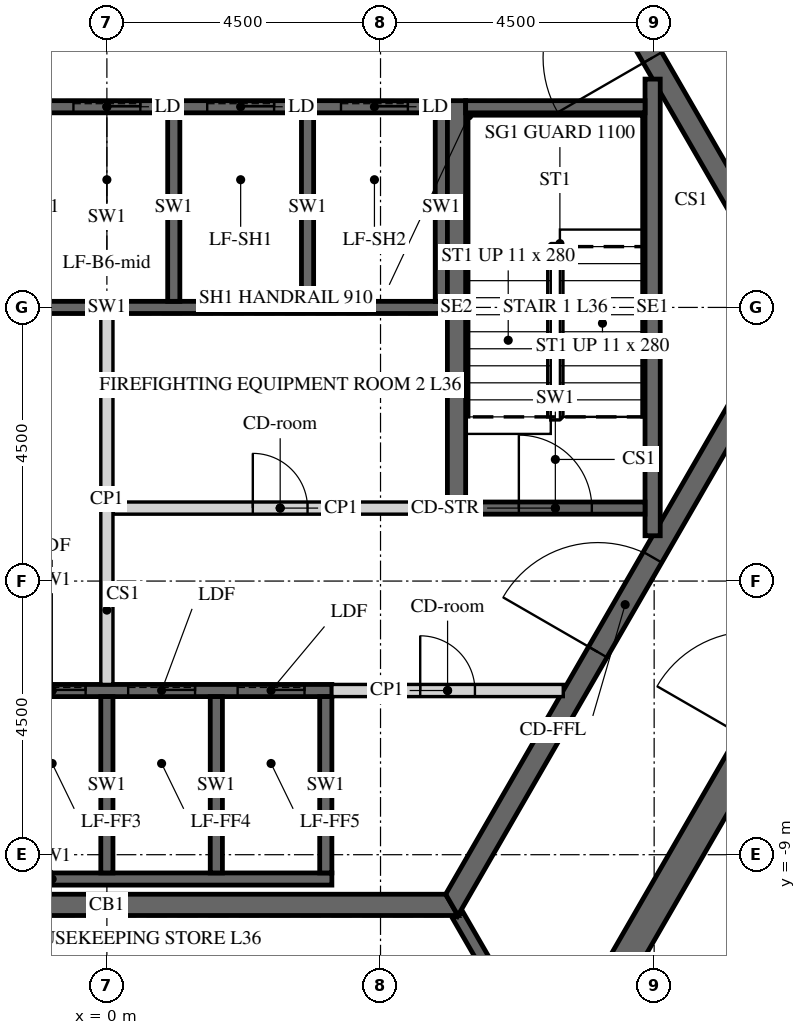
"""IFC4 building model, lengths in metres.
Left out: names, types, materials, properties, quantities, classifications, styles, units other than length and angle.
Written with IfcOpenShell. Run it as: python <this file> out.ifc"""

import sys

from ifc_helpers import new_model, si_unit, direction, frame, frame_2d, origin, place, context, subcontext, project, spatial, polyline, rectangle, outline, extrude, element, fill, save


model = new_model("IFC4")
c1 = context("Model", 3, precision=1e-05, world=origin(), true_north=direction((0.0, 1.0)))
c2 = subcontext(c1, "Body", "Model", "MODEL_VIEW")
j1 = project(units=[si_unit("LENGTHUNIT", "METRE"), si_unit("PLANEANGLEUNIT", "RADIAN")], contexts=[c1])
p1 = place(None, origin())
s1 = spatial("IfcSite", under=j1, at=p1, CompositionType="ELEMENT")
p2 = place(p1, origin())
s2 = spatial("IfcBuilding", under=s1, at=p2, CompositionType="ELEMENT")
p3 = place(p2, frame((0.0, 0.0, 156.6)))
s3 = spatial("IfcBuildingStorey", under=s2, at=p3, CompositionType="ELEMENT", Elevation=156.6)
p4 = place(p3, frame((7.361, -12.75, -0.15), z_axis=(0.0, 0.0, 1.0), x_axis=(0.50000571537, 0.866022103989, 0.0)))
e1 = element("IfcWall", 1, at=p4, inside=s3, PredefinedType="SHEAR", context=c2, shape_type="SweptSolid", body=[
    extrude(outline(polyline([(-0.144, -0.25), (14.867, -0.25), (14.578, 0.25), (0.144, 0.25), (-0.144, -0.25)])), origin(), (0.0, 0.0, 1.0), 3.9),
])
p5 = place(p4, frame((6.49, 0.0, 0.15)))
e2 = element("IfcOpeningElement", 2, at=p5, cuts=e1, PredefinedType="OPENING", context=c2, shape_type="SweptSolid", body=[
    extrude(rectangle(XDim=1.8, YDim=2.4, at=frame_2d((0.9, 1.2))), frame((0.0, 0.26, 0.0), z_axis=(0.0, -1.0, 0.0), x_axis=(1.0, 0.0, 0.0)), (0.0, 0.0, 1.0), 0.52),
])
p6 = place(p3, frame((14.722, 0.0, -0.15), z_axis=(0.0, 0.0, 1.0), x_axis=(-0.50000571537, 0.866022103989, 0.0)))
e3 = element("IfcWall", 3, at=p6, inside=s3, PredefinedType="SHEAR", context=c2, shape_type="SweptSolid", body=[
    extrude(outline(polyline([(-0.144, -0.25), (14.867, -0.25), (14.578, 0.25), (0.144, 0.25), (-0.144, -0.25)])), origin(), (0.0, 0.0, 1.0), 3.9),
])
p7 = place(p6, frame((6.432, 0.0, 0.15)))
e4 = element("IfcOpeningElement", 4, at=p7, cuts=e3, PredefinedType="OPENING", context=c2, shape_type="SweptSolid", body=[
    extrude(rectangle(XDim=1.8, YDim=2.4, at=frame_2d((0.9, 1.2))), frame((0.0, 0.26, 0.0), z_axis=(0.0, -1.0, 0.0), x_axis=(1.0, 0.0, 0.0)), (0.0, 0.0, 1.0), 0.52),
])
p8 = place(p3, frame((-5.673, -9.825, -0.15), z_axis=(0.0, 0.0, 1.0), x_axis=(1.0, 0.0, 0.0)))
e5 = element("IfcWall", 5, at=p8, inside=s3, PredefinedType="SHEAR", context=c2, shape_type="SweptSolid", body=[
    extrude(outline(polyline([(-0.101, -0.175), (11.446, -0.175), (11.244, 0.175), (0.101, 0.175), (-0.101, -0.175)])), origin(), (0.0, 0.0, 1.0), 3.9),
])
p9 = place(p3, frame((5.673, -9.825, -0.15), z_axis=(0.0, 0.0, 1.0), x_axis=(0.499995046907, 0.866028263435, 0.0)))
e6 = element("IfcWall", 6, at=p9, inside=s3, PredefinedType="SHEAR", context=c2, shape_type="SweptSolid", body=[
    extrude(outline(polyline([(-0.101, -0.175), (11.446, -0.175), (11.244, 0.175), (0.101, 0.175), (-0.101, -0.175)])), origin(), (0.0, 0.0, 1.0), 3.9),
])
p10 = place(p9, frame((4.801, 0.0, 0.15)))
e7 = element("IfcOpeningElement", 7, at=p10, cuts=e6, PredefinedType="OPENING", context=c2, shape_type="SweptSolid", body=[
    extrude(rectangle(XDim=1.8, YDim=2.4, at=frame_2d((0.9, 1.2))), frame((0.0, 0.185, 0.0), z_axis=(0.0, -1.0, 0.0), x_axis=(1.0, 0.0, 0.0)), (0.0, 0.0, 1.0), 0.37),
])
p11 = place(p3, frame((11.345, 0.0, -0.15), z_axis=(0.0, 0.0, 1.0), x_axis=(-0.499995046907, 0.866028263435, 0.0)))
e8 = element("IfcWall", 8, at=p11, inside=s3, PredefinedType="SHEAR", context=c2, shape_type="SweptSolid", body=[
    extrude(outline(polyline([(-0.101, -0.175), (11.446, -0.175), (11.244, 0.175), (0.101, 0.175), (-0.101, -0.175)])), origin(), (0.0, 0.0, 1.0), 3.9),
])
p12 = place(p11, frame((4.744, 0.0, 0.15)))
e9 = element("IfcOpeningElement", 9, at=p12, cuts=e8, PredefinedType="OPENING", context=c2, shape_type="SweptSolid", body=[
    extrude(rectangle(XDim=1.8, YDim=2.4, at=frame_2d((0.9, 1.2))), frame((0.0, 0.185, 0.0), z_axis=(0.0, -1.0, 0.0), x_axis=(1.0, 0.0, 0.0)), (0.0, 0.0, 1.0), 0.37),
])
p13 = place(p3, frame((-5.6, 3.3, -0.25), z_axis=(0.0, 0.0, 1.0), x_axis=(1.0, 0.0, 0.0)))
e10 = element("IfcWall", 10, at=p13, inside=s3, PredefinedType="SHEAR", context=c2, shape_type="SweptSolid", body=[
    extrude(rectangle(XDim=11.2, YDim=0.2, at=frame_2d((5.6, 0.0))), origin(), (0.0, 0.0, 1.0), 3.9),
])
p14 = place(p13, frame((0.65, 0.0, 0.25)))
e11 = element("IfcOpeningElement", 11, at=p14, cuts=e10, PredefinedType="OPENING", context=c2, shape_type="SweptSolid", body=[
    extrude(rectangle(XDim=1.1, YDim=2.1, at=frame_2d((0.55, 1.05))), frame((0.0, 0.11, 0.0), z_axis=(0.0, -1.0, 0.0), x_axis=(1.0, 0.0, 0.0)), (0.0, 0.0, 1.0), 0.22),
])
p15 = place(p13, frame((2.85, 0.0, 0.25)))
e12 = element("IfcOpeningElement", 12, at=p15, cuts=e10, PredefinedType="OPENING", context=c2, shape_type="SweptSolid", body=[
    extrude(rectangle(XDim=1.1, YDim=2.1, at=frame_2d((0.55, 1.05))), frame((0.0, 0.11, 0.0), z_axis=(0.0, -1.0, 0.0), x_axis=(1.0, 0.0, 0.0)), (0.0, 0.0, 1.0), 0.22),
])
p16 = place(p13, frame((5.05, 0.0, 0.25)))
e13 = element("IfcOpeningElement", 13, at=p16, cuts=e10, PredefinedType="OPENING", context=c2, shape_type="SweptSolid", body=[
    extrude(rectangle(XDim=1.1, YDim=2.1, at=frame_2d((0.55, 1.05))), frame((0.0, 0.11, 0.0), z_axis=(0.0, -1.0, 0.0), x_axis=(1.0, 0.0, 0.0)), (0.0, 0.0, 1.0), 0.22),
])
p17 = place(p13, frame((7.25, 0.0, 0.25)))
e14 = element("IfcOpeningElement", 14, at=p17, cuts=e10, PredefinedType="OPENING", context=c2, shape_type="SweptSolid", body=[
    extrude(rectangle(XDim=1.1, YDim=2.1, at=frame_2d((0.55, 1.05))), frame((0.0, 0.11, 0.0), z_axis=(0.0, -1.0, 0.0), x_axis=(1.0, 0.0, 0.0)), (0.0, 0.0, 1.0), 0.22),
])
p18 = place(p13, frame((9.45, 0.0, 0.25)))
e15 = element("IfcOpeningElement", 15, at=p18, cuts=e10, PredefinedType="OPENING", context=c2, shape_type="SweptSolid", body=[
    extrude(rectangle(XDim=1.1, YDim=2.1, at=frame_2d((0.55, 1.05))), frame((0.0, 0.11, 0.0), z_axis=(0.0, -1.0, 0.0), x_axis=(1.0, 0.0, 0.0)), (0.0, 0.0, 1.0), 0.22),
])
p19 = place(p3, frame((-5.6, 0.0, -0.25), z_axis=(0.0, 0.0, 1.0), x_axis=(1.0, 0.0, 0.0)))
e16 = element("IfcWall", 16, at=p19, inside=s3, PredefinedType="SHEAR", context=c2, shape_type="SweptSolid", body=[
    extrude(rectangle(XDim=11.2, YDim=0.2, at=frame_2d((5.6, 0.0))), origin(), (0.0, 0.0, 1.0), 3.9),
])
for number, where, z_axis, x_axis in (
    (17, (1.1, 0.1, -0.25), (0.0, 0.0, 1.0), (0.0, 1.0, 0.0)),
    (18, (3.3, 0.1, -0.25), (0.0, 0.0, 1.0), (0.0, 1.0, 0.0)),
    (19, (5.5, 0.1, -0.25), (0.0, 0.0, 1.0), (0.0, 1.0, 0.0)),
):
    element("IfcWall", number, at=place(p3, frame(where, z_axis=z_axis, x_axis=x_axis)), inside=s3, PredefinedType="SHEAR", context=c2, shape_type="SweptSolid", body=[
        extrude(rectangle(XDim=3.1, YDim=0.2, at=frame_2d((1.55, 0.0))), origin(), (0.0, 0.0, 1.0), 3.9),
    ])
p20 = place(p3, frame((-5.5, -6.3, -0.25), z_axis=(0.0, 0.0, 1.0), x_axis=(1.0, 0.0, 0.0)))
e20 = element("IfcWall", 20, at=p20, inside=s3, PredefinedType="SHEAR", context=c2, shape_type="SweptSolid", body=[
    extrude(rectangle(XDim=9.2, YDim=0.2, at=frame_2d((4.6, 0.0))), origin(), (0.0, 0.0, 1.0), 3.9),
])
p21 = place(p20, frame((0.45, 0.0, 0.25)))
e21 = element("IfcOpeningElement", 21, at=p21, cuts=e20, PredefinedType="OPENING", context=c2, shape_type="SweptSolid", body=[
    extrude(rectangle(XDim=1.1, YDim=2.1, at=frame_2d((0.55, 1.05))), frame((0.0, 0.11, 0.0), z_axis=(0.0, -1.0, 0.0), x_axis=(1.0, 0.0, 0.0)), (0.0, 0.0, 1.0), 0.22),
])
p22 = place(p20, frame((2.25, 0.0, 0.25)))
e22 = element("IfcOpeningElement", 22, at=p22, cuts=e20, PredefinedType="OPENING", context=c2, shape_type="SweptSolid", body=[
    extrude(rectangle(XDim=1.1, YDim=2.1, at=frame_2d((0.55, 1.05))), frame((0.0, 0.11, 0.0), z_axis=(0.0, -1.0, 0.0), x_axis=(1.0, 0.0, 0.0)), (0.0, 0.0, 1.0), 0.22),
])
p23 = place(p20, frame((4.05, 0.0, 0.25)))
e23 = element("IfcOpeningElement", 23, at=p23, cuts=e20, PredefinedType="OPENING", context=c2, shape_type="SweptSolid", body=[
    extrude(rectangle(XDim=1.1, YDim=2.1, at=frame_2d((0.55, 1.05))), frame((0.0, 0.11, 0.0), z_axis=(0.0, -1.0, 0.0), x_axis=(1.0, 0.0, 0.0)), (0.0, 0.0, 1.0), 0.22),
])
p24 = place(p20, frame((5.85, 0.0, 0.25)))
e24 = element("IfcOpeningElement", 24, at=p24, cuts=e20, PredefinedType="OPENING", context=c2, shape_type="SweptSolid", body=[
    extrude(rectangle(XDim=1.1, YDim=2.1, at=frame_2d((0.55, 1.05))), frame((0.0, 0.11, 0.0), z_axis=(0.0, -1.0, 0.0), x_axis=(1.0, 0.0, 0.0)), (0.0, 0.0, 1.0), 0.22),
])
p25 = place(p20, frame((7.65, 0.0, 0.25)))
e25 = element("IfcOpeningElement", 25, at=p25, cuts=e20, PredefinedType="OPENING", context=c2, shape_type="SweptSolid", body=[
    extrude(rectangle(XDim=1.1, YDim=2.1, at=frame_2d((0.55, 1.05))), frame((0.0, 0.11, 0.0), z_axis=(0.0, -1.0, 0.0), x_axis=(1.0, 0.0, 0.0)), (0.0, 0.0, 1.0), 0.22),
])
p26 = place(p3, frame((-5.5, -9.4, -0.25), z_axis=(0.0, 0.0, 1.0), x_axis=(1.0, 0.0, 0.0)))
e26 = element("IfcWall", 26, at=p26, inside=s3, PredefinedType="SHEAR", context=c2, shape_type="SweptSolid", body=[
    extrude(rectangle(XDim=9.2, YDim=0.2, at=frame_2d((4.6, 0.0))), origin(), (0.0, 0.0, 1.0), 3.9),
])
for number, where, z_axis, x_axis in (
    (27, (0.0, -9.3, -0.25), (0.0, 0.0, 1.0), (0.0, 1.0, 0.0)),
    (28, (1.8, -9.3, -0.25), (0.0, 0.0, 1.0), (0.0, 1.0, 0.0)),
    (29, (3.6, -9.3, -0.25), (0.0, 0.0, 1.0), (0.0, 1.0, 0.0)),
):
    element("IfcWall", number, at=place(p3, frame(where, z_axis=z_axis, x_axis=x_axis)), inside=s3, PredefinedType="SHEAR", context=c2, shape_type="SweptSolid", body=[
        extrude(rectangle(XDim=2.9, YDim=0.2, at=frame_2d((1.45, 0.0))), origin(), (0.0, 0.0, 1.0), 3.9),
    ])
p27 = place(p3, frame((0.1, -3.3, 0.0), z_axis=(0.0, 0.0, 1.0), x_axis=(1.0, 0.0, 0.0)))
e30 = element("IfcWall", 30, at=p27, inside=s3, PredefinedType="PARTITIONING", context=c2, shape_type="SweptSolid", body=[
    extrude(rectangle(XDim=5.5, YDim=0.2, at=frame_2d((2.75, 0.0))), origin(), (0.0, 0.0, 1.0), 3.65),
])
p28 = place(p27, frame((2.3, 0.0, 0.0)))
e31 = element("IfcOpeningElement", 31, at=p28, cuts=e30, PredefinedType="OPENING", context=c2, shape_type="SweptSolid", body=[
    extrude(rectangle(XDim=0.9, YDim=2.1, at=frame_2d((0.45, 1.05))), frame((0.0, 0.11, 0.0), z_axis=(0.0, -1.0, 0.0), x_axis=(1.0, 0.0, 0.0)), (0.0, 0.0, 1.0), 0.22),
])
p29 = place(p3, frame((0.0, -6.2, 0.0), z_axis=(0.0, 0.0, 1.0), x_axis=(0.0, 1.0, 0.0)))
e32 = element("IfcWall", 32, at=p29, inside=s3, PredefinedType="PARTITIONING", context=c2, shape_type="SweptSolid", body=[
    extrude(rectangle(XDim=6.1, YDim=0.2, at=frame_2d((3.05, 0.0))), origin(), (0.0, 0.0, 1.0), 3.65),
])
p30 = place(p3, frame((3.7, -6.3, 0.0), z_axis=(0.0, 0.0, 1.0), x_axis=(1.0, 0.0, 0.0)))
e33 = element("IfcWall", 33, at=p30, inside=s3, PredefinedType="PARTITIONING", context=c2, shape_type="SweptSolid", body=[
    extrude(rectangle(XDim=3.806, YDim=0.2, at=frame_2d((1.903, 0.0))), origin(), (0.0, 0.0, 1.0), 3.65),
])
p31 = place(p30, frame((1.453, 0.0, 0.0)))
e34 = element("IfcOpeningElement", 34, at=p31, cuts=e33, PredefinedType="OPENING", context=c2, shape_type="SweptSolid", body=[
    extrude(rectangle(XDim=0.9, YDim=2.1, at=frame_2d((0.45, 1.05))), frame((0.0, 0.11, 0.0), z_axis=(0.0, -1.0, 0.0), x_axis=(1.0, 0.0, 0.0)), (0.0, 0.0, 1.0), 0.22),
])
p32 = place(p3, frame((5.773, -10.0, -0.15), z_axis=(0.0, 0.0, 1.0), x_axis=(0.499995765644, -0.866027848477, 0.0)))
e35 = element("IfcWall", 35, at=p32, inside=s3, PredefinedType="SHEAR", context=c2, shape_type="SweptSolid", body=[
    extrude(rectangle(XDim=2.887, YDim=0.2, at=frame_2d((1.443, 0.0))), origin(), (0.0, 0.0, 1.0), 3.9),
])
p33 = place(p3, frame((5.75, -3.4, -0.25), z_axis=(0.0, 0.0, 1.0), x_axis=(0.0, 1.0, 0.0)))
e36 = element("IfcWall", 36, at=p33, inside=s3, PredefinedType="SHEAR", context=c2, shape_type="SweptSolid", body=[
    extrude(rectangle(XDim=6.8, YDim=0.3, at=frame_2d((3.4, 0.0))), origin(), (0.0, 0.0, 1.0), 3.9),
])
p34 = place(p3, frame((8.975, -3.755, -0.25), z_axis=(0.0, 0.0, 1.0), x_axis=(0.0, 1.0, 0.0)))
e37 = element("IfcWall", 37, at=p34, inside=s3, PredefinedType="SHEAR", context=c2, shape_type="SweptSolid", body=[
    extrude(rectangle(XDim=7.51, YDim=0.25, at=frame_2d((3.755, 0.0))), origin(), (0.0, 0.0, 1.0), 3.9),
])
p35 = place(p3, frame((5.9, 3.3, -0.25), z_axis=(0.0, 0.0, 1.0), x_axis=(1.0, 0.0, 0.0)))
e38 = element("IfcWall", 38, at=p35, inside=s3, PredefinedType="SHEAR", context=c2, shape_type="SweptSolid", body=[
    extrude(rectangle(XDim=2.95, YDim=0.2, at=frame_2d((1.475, 0.0))), origin(), (0.0, 0.0, 1.0), 3.9),
])
p36 = place(p3, frame((5.9, -3.3, -0.25), z_axis=(0.0, 0.0, 1.0), x_axis=(1.0, 0.0, 0.0)))
e39 = element("IfcWall", 39, at=p36, inside=s3, PredefinedType="SHEAR", context=c2, shape_type="SweptSolid", body=[
    extrude(rectangle(XDim=2.95, YDim=0.2, at=frame_2d((1.475, 0.0))), origin(), (0.0, 0.0, 1.0), 3.9),
])
p37 = place(p36, frame((0.875, 0.0, 0.25)))
e40 = element("IfcOpeningElement", 40, at=p37, cuts=e39, PredefinedType="OPENING", context=c2, shape_type="SweptSolid", body=[
    extrude(rectangle(XDim=1.2, YDim=2.4, at=frame_2d((0.6, 1.2))), frame((0.0, 0.11, 0.0), z_axis=(0.0, -1.0, 0.0), x_axis=(1.0, 0.0, 0.0)), (0.0, 0.0, 1.0), 0.22),
])
p38 = place(p3, frame((17.046, 0.075, 0.0), z_axis=(0.0, 0.0, 1.0), x_axis=(-0.499999403554, 0.866025748143, 0.0)))
e41 = element("IfcWall", 41, at=p38, inside=s3, PredefinedType="PARTITIONING", context=c2, shape_type="SweptSolid", body=[
    extrude(rectangle(XDim=14.549, YDim=0.15, at=frame_2d((7.275, 0.0))), origin(), (0.0, 0.0, 1.0), 2.823),
])
p39 = place(p38, frame((1.781, 0.0, 0.0)))
e42 = element("IfcOpeningElement", 42, at=p39, cuts=e41, PredefinedType="OPENING", context=c2, shape_type="SweptSolid", body=[
    extrude(rectangle(XDim=1.0, YDim=2.1, at=frame_2d((0.5, 1.05))), frame((0.0, 0.085, 0.0), z_axis=(0.0, -1.0, 0.0), x_axis=(1.0, 0.0, 0.0)), (0.0, 0.0, 1.0), 0.17),
])
p40 = place(p38, frame((8.705, 0.0, 0.0)))
e43 = element("IfcOpeningElement", 43, at=p40, cuts=e41, PredefinedType="OPENING", context=c2, shape_type="SweptSolid", body=[
    extrude(rectangle(XDim=1.0, YDim=2.1, at=frame_2d((0.5, 1.05))), frame((0.0, 0.085, 0.0), z_axis=(0.0, -1.0, 0.0), x_axis=(1.0, 0.0, 0.0)), (0.0, 0.0, 1.0), 0.17),
])
p41 = place(p12, origin())
e44 = element("IfcDoor", 44, at=p41, inside=s3, OperationType="DOUBLE_DOOR_SINGLE_SWING", PredefinedType="DOOR", context=c2, shape_type="SweptSolid", body=[
    extrude(rectangle(XDim=1.8, YDim=2.4, at=frame_2d((0.9, 1.2))), frame((0.0, 0.025, 0.0), z_axis=(0.0, -1.0, 0.0), x_axis=(1.0, 0.0, 0.0)), (0.0, 0.0, 1.0), 0.05),
])
fill(e9, e44)
p42 = place(p10, origin())
e45 = element("IfcDoor", 45, at=p42, inside=s3, OperationType="DOUBLE_DOOR_SINGLE_SWING", PredefinedType="DOOR", context=c2, shape_type="SweptSolid", body=[
    extrude(rectangle(XDim=1.8, YDim=2.4, at=frame_2d((0.9, 1.2))), frame((0.0, 0.025, 0.0), z_axis=(0.0, -1.0, 0.0), x_axis=(1.0, 0.0, 0.0)), (0.0, 0.0, 1.0), 0.05),
])
fill(e7, e45)
p43 = place(p28, origin())
e46 = element("IfcDoor", 46, at=p43, inside=s3, OperationType="SINGLE_SWING_LEFT", PredefinedType="DOOR", context=c2, shape_type="SweptSolid", body=[
    extrude(rectangle(XDim=0.9, YDim=2.1, at=frame_2d((0.45, 1.05))), frame((0.0, 0.025, 0.0), z_axis=(0.0, -1.0, 0.0), x_axis=(1.0, 0.0, 0.0)), (0.0, 0.0, 1.0), 0.05),
])
fill(e31, e46)
p44 = place(p31, origin())
e47 = element("IfcDoor", 47, at=p44, inside=s3, OperationType="SINGLE_SWING_LEFT", PredefinedType="DOOR", context=c2, shape_type="SweptSolid", body=[
    extrude(rectangle(XDim=0.9, YDim=2.1, at=frame_2d((0.45, 1.05))), frame((0.0, 0.025, 0.0), z_axis=(0.0, -1.0, 0.0), x_axis=(1.0, 0.0, 0.0)), (0.0, 0.0, 1.0), 0.05),
])
fill(e34, e47)
p45 = place(p37, origin())
e48 = element("IfcDoor", 48, at=p45, inside=s3, OperationType="SINGLE_SWING_LEFT", PredefinedType="DOOR", context=c2, shape_type="SweptSolid", body=[
    extrude(rectangle(XDim=1.2, YDim=2.4, at=frame_2d((0.6, 1.2))), frame((0.0, 0.025, 0.0), z_axis=(0.0, -1.0, 0.0), x_axis=(1.0, 0.0, 0.0)), (0.0, 0.0, 1.0), 0.05),
])
fill(e40, e48)
p46 = place(p16, origin())
e49 = element("IfcDoor", 49, at=p46, inside=s3, OperationType="SLIDING_TO_LEFT", PredefinedType="DOOR", context=c2, shape_type="SweptSolid", body=[
    extrude(rectangle(XDim=1.1, YDim=2.1, at=frame_2d((0.55, 1.05))), frame((0.0, 0.025, 0.0), z_axis=(0.0, -1.0, 0.0), x_axis=(1.0, 0.0, 0.0)), (0.0, 0.0, 1.0), 0.05),
])
fill(e13, e49)
p47 = place(p17, origin())
e50 = element("IfcDoor", 50, at=p47, inside=s3, OperationType="SLIDING_TO_LEFT", PredefinedType="DOOR", context=c2, shape_type="SweptSolid", body=[
    extrude(rectangle(XDim=1.1, YDim=2.1, at=frame_2d((0.55, 1.05))), frame((0.0, 0.025, 0.0), z_axis=(0.0, -1.0, 0.0), x_axis=(1.0, 0.0, 0.0)), (0.0, 0.0, 1.0), 0.05),
])
fill(e14, e50)
p48 = place(p18, origin())
e51 = element("IfcDoor", 51, at=p48, inside=s3, OperationType="SLIDING_TO_LEFT", PredefinedType="DOOR", context=c2, shape_type="SweptSolid", body=[
    extrude(rectangle(XDim=1.1, YDim=2.1, at=frame_2d((0.55, 1.05))), frame((0.0, 0.025, 0.0), z_axis=(0.0, -1.0, 0.0), x_axis=(1.0, 0.0, 0.0)), (0.0, 0.0, 1.0), 0.05),
])
fill(e15, e51)
p49 = place(p23, origin())
e52 = element("IfcDoor", 52, at=p49, inside=s3, OperationType="SLIDING_TO_LEFT", PredefinedType="DOOR", context=c2, shape_type="SweptSolid", body=[
    extrude(rectangle(XDim=1.1, YDim=2.1, at=frame_2d((0.55, 1.05))), frame((0.0, 0.025, 0.0), z_axis=(0.0, -1.0, 0.0), x_axis=(1.0, 0.0, 0.0)), (0.0, 0.0, 1.0), 0.05),
])
fill(e23, e52)
p50 = place(p24, origin())
e53 = element("IfcDoor", 53, at=p50, inside=s3, OperationType="SLIDING_TO_LEFT", PredefinedType="DOOR", context=c2, shape_type="SweptSolid", body=[
    extrude(rectangle(XDim=1.1, YDim=2.1, at=frame_2d((0.55, 1.05))), frame((0.0, 0.025, 0.0), z_axis=(0.0, -1.0, 0.0), x_axis=(1.0, 0.0, 0.0)), (0.0, 0.0, 1.0), 0.05),
])
fill(e24, e53)
p51 = place(p25, origin())
e54 = element("IfcDoor", 54, at=p51, inside=s3, OperationType="SLIDING_TO_LEFT", PredefinedType="DOOR", context=c2, shape_type="SweptSolid", body=[
    extrude(rectangle(XDim=1.1, YDim=2.1, at=frame_2d((0.55, 1.05))), frame((0.0, 0.025, 0.0), z_axis=(0.0, -1.0, 0.0), x_axis=(1.0, 0.0, 0.0)), (0.0, 0.0, 1.0), 0.05),
])
fill(e25, e54)
save(model, sys.argv[1])
